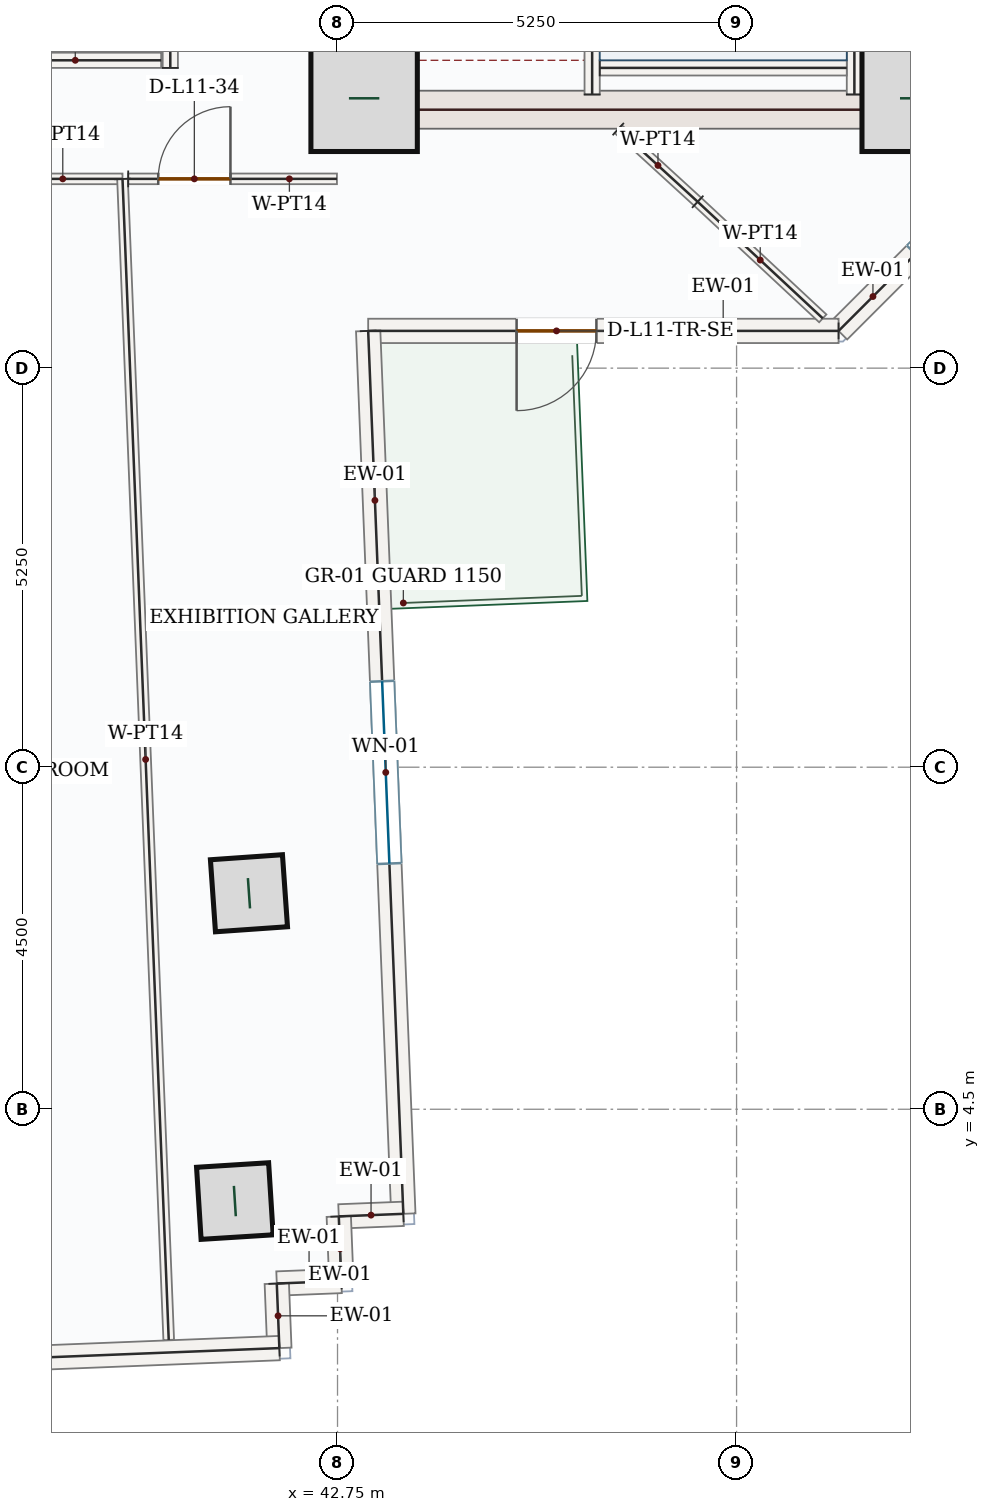
"""IFC4 building model, lengths in metres.
Left out: names, types, materials, properties, quantities, classifications, styles, units other than length and angle.
Written with IfcOpenShell. Run it as: python <this file> out.ifc"""

import sys

from ifc_helpers import new_model, si_unit, direction, frame, frame_2d, origin, origin_2d, place, context, subcontext, project, spatial, rectangle, hollow_rectangle, extrude, source, transform, mapped, element, fill, save


model = new_model("IFC4")
c1 = context("Model", 3, precision=1e-05, world=origin(), true_north=direction((0.0, 1.0)))
c2 = subcontext(c1, "Body", "Model", "MODEL_VIEW")
j1 = project(units=[si_unit("LENGTHUNIT", "METRE"), si_unit("PLANEANGLEUNIT", "RADIAN")], contexts=[c1])
p1 = place(None, origin())
s1 = spatial("IfcSite", under=j1, at=p1, CompositionType="ELEMENT")
p2 = place(p1, origin())
s2 = spatial("IfcBuilding", under=s1, at=p2, CompositionType="ELEMENT")
p3 = place(p2, frame((0.0, 0.0, 54.3)))
s3 = spatial("IfcBuildingStorey", under=s2, at=p3, CompositionType="ELEMENT", Elevation=54.3)
p4 = place(p3, frame((43.0, 17.4, 0.0), z_axis=(0.0, 0.0, 1.0), x_axis=(0.0, 1.0, 0.0)))
e1 = element("IfcWall", 1, at=p4, inside=s3, PredefinedType="SHEAR", context=c2, shape_type="SweptSolid", body=[
    extrude(rectangle(XDim=8.55, YDim=0.5, at=frame_2d((4.275, 0.0))), origin(), (0.0, 0.0, 1.0), 3.95),
])
p5 = place(p4, frame((6.65, 0.0, 0.0)))
e2 = element("IfcOpeningElement", 2, at=p5, cuts=e1, PredefinedType="OPENING", context=c2, shape_type="SweptSolid", body=[
    extrude(rectangle(XDim=1.1, YDim=2.2, at=frame_2d((0.55, 1.1))), frame((0.0, 0.26, 0.0), z_axis=(0.0, -1.0, 0.0), x_axis=(1.0, 0.0, 0.0)), (0.0, 0.0, 1.0), 0.52),
])
p6 = place(p4, frame((1.75, 0.0, 0.0)))
e3 = element("IfcOpeningElement", 3, at=p6, cuts=e1, PredefinedType="OPENING", context=c2, shape_type="SweptSolid", body=[
    extrude(rectangle(XDim=1.3, YDim=2.2, at=frame_2d((0.65, 1.1))), frame((0.0, 0.26, 0.0), z_axis=(0.0, -1.0, 0.0), x_axis=(1.0, 0.0, 0.0)), (0.0, 0.0, 1.0), 0.52),
])
p7 = place(p4, frame((4.3, 0.0, 0.0)))
e4 = element("IfcOpeningElement", 4, at=p7, cuts=e1, PredefinedType="OPENING", context=c2, shape_type="SweptSolid", body=[
    extrude(rectangle(XDim=0.88, YDim=2.1, at=frame_2d((0.44, 1.05))), frame((0.0, 0.26, 0.0), z_axis=(0.0, -1.0, 0.0), x_axis=(1.0, 0.0, 0.0)), (0.0, 0.0, 1.0), 0.52),
])
m1 = source(origin(), c2, "Body", "SweptSolid", [
    extrude(rectangle(XDim=8.55, YDim=0.5, at=frame_2d((4.275, 0.0))), origin(), (0.0, 0.0, 1.0), 3.95),
])
p8 = place(p3, frame((50.5, 17.4, 0.0), z_axis=(0.0, 0.0, 1.0), x_axis=(0.0, 1.0, 0.0)))
e5 = element("IfcWall", 5, at=p8, inside=s3, PredefinedType="SHEAR", context=c2, shape_type="MappedRepresentation", body=[
    mapped(m1, transform((0.0, 0.0, 0.0), x_axis=(1.0, 0.0, 0.0), y_axis=(0.0, 1.0, 0.0), z_axis=(0.0, 0.0, 1.0), scale=1.0)),
])
m2 = source(origin(), c2, "Body", "SweptSolid", [
    extrude(rectangle(XDim=7.0, YDim=0.5, at=frame_2d((3.5, 0.0))), origin(), (0.0, 0.0, 1.0), 3.95),
])
p9 = place(p3, frame((43.25, 17.65, 0.0), z_axis=(0.0, 0.0, 1.0), x_axis=(1.0, 0.0, 0.0)))
e6 = element("IfcWall", 6, at=p9, inside=s3, PredefinedType="SHEAR", context=c2, shape_type="MappedRepresentation", body=[
    mapped(m2, transform((0.0, 0.0, 0.0), x_axis=(1.0, 0.0, 0.0), y_axis=(0.0, 1.0, 0.0), z_axis=(0.0, 0.0, 1.0), scale=1.0)),
])
m3 = source(origin(), c2, "Body", "SweptSolid", [
    extrude(rectangle(XDim=1.4, YDim=1.4, at=origin_2d()), origin(), (0.0, 0.0, 1.0), 4.2),
])
for number, where, z_axis, x_axis in (
    (7, (43.1, 17.8, 0.0), (0.0, 0.0, 1.0), (1.0, 0.0, 0.0)),
    (8, (50.35, 17.8, 0.0), (0.0, 0.0, 1.0), (1.0, 0.0, 0.0)),
):
    element("IfcColumn", number, at=place(p3, frame(where, z_axis=z_axis, x_axis=x_axis)), inside=s3, PredefinedType="COLUMN", context=c2, shape_type="MappedRepresentation", body=[
        mapped(m3, transform((0.0, 0.0, 0.0), x_axis=(1.0, 0.0, 0.0), y_axis=(0.0, 1.0, 0.0), z_axis=(0.0, 0.0, 1.0), scale=1.0)),
    ])
m4 = source(origin(), c2, "Body", "SweptSolid", [
    extrude(hollow_rectangle(XDim=0.95, YDim=0.95, WallThickness=0.05, at=origin_2d()), origin(), (0.0, 0.0, 1.0), 4.2),
])
for number, where, z_axis, x_axis in (
    (9, (41.585, 7.342, 0.0), (0.0, 0.0, 1.0), (-0.07, 0.998, 0.0)),
    (10, (41.399, 3.292, 0.0), (0.0, 0.0, 1.0), (-0.063, 0.998, 0.0)),
):
    element("IfcColumn", number, at=place(p3, frame(where, z_axis=z_axis, x_axis=x_axis)), inside=s3, PredefinedType="COLUMN", context=c2, shape_type="MappedRepresentation", body=[
        mapped(m4, transform((0.0, 0.0, 0.0), x_axis=(1.0, 0.0, 0.0), y_axis=(0.0, 1.0, 0.0), z_axis=(0.0, 0.0, 1.0), scale=1.0)),
    ])
p10 = place(p3, frame((53.06, 18.458, 0.0), z_axis=(0.0, 0.0, 1.0), x_axis=(-0.707106781187, -0.707106781187, 0.0)))
e11 = element("IfcWall", 11, at=p10, inside=s3, PredefinedType="SOLIDWALL", context=c2, shape_type="SweptSolid", body=[
    extrude(rectangle(XDim=5.258, YDim=0.32, at=frame_2d((2.629, 0.0))), origin(), (0.0, 0.0, 1.0), 3.95),
])
p11 = place(p10, frame((1.429, 0.0, 0.85)))
e12 = element("IfcOpeningElement", 12, at=p11, cuts=e11, PredefinedType="OPENING", context=c2, shape_type="SweptSolid", body=[
    extrude(rectangle(XDim=2.4, YDim=1.8, at=frame_2d((1.2, 0.9))), frame((0.0, 0.17, 0.0), z_axis=(0.0, -1.0, 0.0), x_axis=(1.0, 0.0, 0.0)), (0.0, 0.0, 1.0), 0.34),
])
p12 = place(p3, frame((49.342, 14.74, 0.0), z_axis=(0.0, 0.0, 1.0), x_axis=(-1.0, 0.0, 0.0)))
e13 = element("IfcWall", 13, at=p12, inside=s3, PredefinedType="SOLIDWALL", context=c2, shape_type="SweptSolid", body=[
    extrude(rectangle(XDim=6.189, YDim=0.32, at=frame_2d((3.094, 0.0))), origin(), (0.0, 0.0, 1.0), 3.95),
])
p13 = place(p12, frame((3.186, 0.0, 0.0)))
e14 = element("IfcOpeningElement", 14, at=p13, cuts=e13, PredefinedType="OPENING", context=c2, shape_type="SweptSolid", body=[
    extrude(rectangle(XDim=1.05, YDim=2.15, at=frame_2d((0.525, 1.075))), frame((0.0, 0.17, 0.0), z_axis=(0.0, -1.0, 0.0), x_axis=(1.0, 0.0, 0.0)), (0.0, 0.0, 1.0), 0.34),
])
p14 = place(p3, frame((43.153, 14.74, 0.0), z_axis=(0.0, 0.0, 1.0), x_axis=(0.039775975357, -0.999208622753, 0.0)))
e15 = element("IfcWall", 15, at=p14, inside=s3, PredefinedType="SOLIDWALL", context=c2, shape_type="SweptSolid", body=[
    extrude(rectangle(XDim=11.625, YDim=0.32, at=frame_2d((5.812, 0.0))), origin(), (0.0, 0.0, 1.0), 3.95),
])
p15 = place(p14, frame((4.613, 0.0, 0.85)))
e16 = element("IfcOpeningElement", 16, at=p15, cuts=e15, PredefinedType="OPENING", context=c2, shape_type="SweptSolid", body=[
    extrude(rectangle(XDim=2.4, YDim=1.8, at=frame_2d((1.2, 0.9))), frame((0.0, 0.17, 0.0), z_axis=(0.0, -1.0, 0.0), x_axis=(1.0, 0.0, 0.0)), (0.0, 0.0, 1.0), 0.34),
])
m5 = source(origin(), c2, "Body", "SweptSolid", [
    extrude(rectangle(XDim=0.85, YDim=0.32, at=frame_2d((0.425, 0.0))), origin(), (0.0, 0.0, 1.0), 3.95),
])
for number, where, z_axis, x_axis in (
    (17, (43.616, 3.124, 0.0), (0.0, 0.0, 1.0), (-0.999, -0.04, 0.0)),
    (18, (42.767, 3.09, 0.0), (0.0, 0.0, 1.0), (0.04, -0.999, 0.0)),
):
    element("IfcWall", number, at=place(p3, frame(where, z_axis=z_axis, x_axis=x_axis)), inside=s3, PredefinedType="SOLIDWALL", context=c2, shape_type="MappedRepresentation", body=[
        mapped(m5, transform((0.0, 0.0, 0.0), x_axis=(1.0, 0.0, 0.0), y_axis=(0.0, 1.0, 0.0), z_axis=(0.0, 0.0, 1.0), scale=1.0)),
    ])
m6 = source(origin(), c2, "Body", "SweptSolid", [
    extrude(rectangle(XDim=0.85, YDim=0.32, at=frame_2d((0.425, 0.0))), origin(), (0.0, 0.0, 1.0), 3.95),
])
p16 = place(p3, frame((42.8, 2.241, 0.0), z_axis=(0.0, 0.0, 1.0), x_axis=(-0.999202792875, -0.039922158152, 0.0)))
e19 = element("IfcWall", 19, at=p16, inside=s3, PredefinedType="SOLIDWALL", context=c2, shape_type="MappedRepresentation", body=[
    mapped(m6, transform((0.0, 0.0, 0.0), x_axis=(1.0, 0.0, 0.0), y_axis=(0.0, 1.0, 0.0), z_axis=(0.0, 0.0, 1.0), scale=1.0)),
])
p17 = place(p3, frame((41.951, 2.207, 0.0), z_axis=(0.0, 0.0, 1.0), x_axis=(0.039933618331, -0.999202334929, 0.0)))
e20 = element("IfcWall", 20, at=p17, inside=s3, PredefinedType="SOLIDWALL", context=c2, shape_type="MappedRepresentation", body=[
    mapped(m5, transform((0.0, 0.0, 0.0), x_axis=(1.0, 0.0, 0.0), y_axis=(0.0, 1.0, 0.0), z_axis=(0.0, 0.0, 1.0), scale=1.0)),
])
m7 = source(origin(), c2, "Body", "SweptSolid", [
    extrude(rectangle(XDim=9.92, YDim=0.32, at=frame_2d((4.96, 0.0))), origin(), (0.0, 0.0, 1.0), 3.95),
])
p18 = place(p3, frame((41.985, 1.358, 0.0), z_axis=(0.0, 0.0, 1.0), x_axis=(-0.999207823998, -0.039796035749, 0.0)))
e21 = element("IfcWall", 21, at=p18, inside=s3, PredefinedType="SOLIDWALL", context=c2, shape_type="MappedRepresentation", body=[
    mapped(m7, transform((0.0, 0.0, 0.0), x_axis=(1.0, 0.0, 0.0), y_axis=(0.0, 1.0, 0.0), z_axis=(0.0, 0.0, 1.0), scale=1.0)),
])
m8 = source(origin(), c2, "Body", "SweptSolid", [
    extrude(rectangle(XDim=7.87, YDim=0.2, at=frame_2d((3.935, 0.0))), origin(), (0.0, 0.0, 1.0), 3.95),
])
p19 = place(p3, frame((49.55, 17.85, 0.0), z_axis=(0.0, 0.0, 1.0), x_axis=(0.0, 1.0, 0.0)))
e22 = element("IfcWall", 22, at=p19, inside=s3, PredefinedType="SOLIDWALL", context=c2, shape_type="MappedRepresentation", body=[
    mapped(m8, transform((0.0, 0.0, 0.0), x_axis=(1.0, 0.0, 0.0), y_axis=(0.0, 1.0, 0.0), z_axis=(0.0, 0.0, 1.0), scale=1.0)),
])
p20 = place(p3, frame((46.1, 17.85, 0.0), z_axis=(0.0, 0.0, 1.0), x_axis=(0.0, 1.0, 0.0)))
e23 = element("IfcWall", 23, at=p20, inside=s3, PredefinedType="SOLIDWALL", context=c2, shape_type="SweptSolid", body=[
    extrude(rectangle(XDim=8.0, YDim=0.2, at=frame_2d((4.0, 0.0))), origin(), (0.0, 0.0, 1.0), 3.95),
])
p21 = place(p20, frame((6.3, 0.0, 0.0)))
e24 = element("IfcOpeningElement", 24, at=p21, cuts=e23, PredefinedType="OPENING", context=c2, shape_type="SweptSolid", body=[
    extrude(rectangle(XDim=1.05, YDim=2.15, at=frame_2d((0.525, 1.075))), frame((0.0, 0.11, 0.0), z_axis=(0.0, -1.0, 0.0), x_axis=(1.0, 0.0, 0.0)), (0.0, 0.0, 1.0), 0.22),
])
m9 = source(origin(), c2, "Body", "SweptSolid", [
    extrude(rectangle(XDim=3.25, YDim=0.2, at=frame_2d((1.625, 0.0))), origin(), (0.0, 0.0, 1.0), 3.95),
])
p22 = place(p3, frame((46.2, 18.2, 0.0), z_axis=(0.0, 0.0, 1.0), x_axis=(1.0, 0.0, 0.0)))
e25 = element("IfcWall", 25, at=p22, inside=s3, PredefinedType="SOLIDWALL", context=c2, shape_type="MappedRepresentation", body=[
    mapped(m9, transform((0.0, 0.0, 0.0), x_axis=(1.0, 0.0, 0.0), y_axis=(0.0, 1.0, 0.0), z_axis=(0.0, 0.0, 1.0), scale=1.0)),
])
m10 = source(origin(), c2, "Body", "SweptSolid", [
    extrude(rectangle(XDim=2.35, YDim=0.2, at=frame_2d((1.175, 0.0))), origin(), (0.0, 0.0, 1.0), 3.95),
])
p23 = place(p3, frame((40.55, 18.2, 0.0), z_axis=(0.0, 0.0, 1.0), x_axis=(0.0, 1.0, 0.0)))
e26 = element("IfcWall", 26, at=p23, inside=s3, PredefinedType="SOLIDWALL", context=c2, shape_type="MappedRepresentation", body=[
    mapped(m10, transform((0.0, 0.0, 0.0), x_axis=(1.0, 0.0, 0.0), y_axis=(0.0, 1.0, 0.0), z_axis=(0.0, 0.0, 1.0), scale=1.0)),
])
m11 = source(origin(), c2, "Body", "SweptSolid", [
    extrude(rectangle(XDim=2.26, YDim=0.2, at=frame_2d((1.13, 0.0))), origin(), (0.0, 0.0, 1.0), 3.95),
])
p24 = place(p3, frame((38.17, 18.3, 0.0), z_axis=(0.0, 0.0, 1.0), x_axis=(1.0, 0.0, 0.0)))
e27 = element("IfcWall", 27, at=p24, inside=s3, PredefinedType="SOLIDWALL", context=c2, shape_type="MappedRepresentation", body=[
    mapped(m11, transform((0.0, 0.0, 0.0), x_axis=(1.0, 0.0, 0.0), y_axis=(0.0, 1.0, 0.0), z_axis=(0.0, 0.0, 1.0), scale=1.0)),
])
p25 = place(p3, frame((36.764, 16.74, 0.0), z_axis=(0.0, 0.0, 1.0), x_axis=(1.0, 0.0, 0.0)))
e28 = element("IfcWall", 28, at=p25, inside=s3, PredefinedType="PARTITIONING", context=c2, shape_type="SweptSolid", body=[
    extrude(rectangle(XDim=3.157, YDim=0.14, at=frame_2d((1.579, 0.0))), origin(), (0.0, 0.0, 1.0), 3.95),
])
p26 = place(p25, frame((0.486, 0.0, 0.0)))
e29 = element("IfcOpeningElement", 29, at=p26, cuts=e28, PredefinedType="OPENING", context=c2, shape_type="SweptSolid", body=[
    extrude(rectangle(XDim=0.95, YDim=2.15, at=frame_2d((0.475, 1.075))), frame((0.0, 0.08, 0.0), z_axis=(0.0, -1.0, 0.0), x_axis=(1.0, 0.0, 0.0)), (0.0, 0.0, 1.0), 0.16),
])
m12 = source(origin(), c2, "Body", "SweptSolid", [
    extrude(rectangle(XDim=15.286, YDim=0.14, at=frame_2d((7.643, 0.0))), origin(), (0.0, 0.0, 1.0), 3.95),
])
p27 = place(p3, frame((39.921, 16.739, 0.0), z_axis=(0.0, 0.0, 1.0), x_axis=(0.039769031662, -0.99920889914, 0.0)))
e30 = element("IfcWall", 30, at=p27, inside=s3, PredefinedType="PARTITIONING", context=c2, shape_type="MappedRepresentation", body=[
    mapped(m12, transform((0.0, 0.0, 0.0), x_axis=(1.0, 0.0, 0.0), y_axis=(0.0, 1.0, 0.0), z_axis=(0.0, 0.0, 1.0), scale=1.0)),
])
p28 = place(p3, frame((39.996, 16.74, 0.0), z_axis=(0.0, 0.0, 1.0), x_axis=(0.999999996048, 8.8904694e-05, 0.0)))
e31 = element("IfcWall", 31, at=p28, inside=s3, PredefinedType="PARTITIONING", context=c2, shape_type="SweptSolid", body=[
    extrude(rectangle(XDim=2.746, YDim=0.14, at=frame_2d((1.373, 0.0))), origin(), (0.0, 0.0, 1.0), 3.95),
])
p29 = place(p28, frame((0.395, 0.0, 0.0)))
e32 = element("IfcOpeningElement", 32, at=p29, cuts=e31, PredefinedType="OPENING", context=c2, shape_type="SweptSolid", body=[
    extrude(rectangle(XDim=0.95, YDim=2.15, at=frame_2d((0.475, 1.075))), frame((0.0, 0.08, 0.0), z_axis=(0.0, -1.0, 0.0), x_axis=(1.0, 0.0, 0.0)), (0.0, 0.0, 1.0), 0.16),
])
m13 = source(origin(), c2, "Body", "SweptSolid", [
    extrude(rectangle(XDim=1.417, YDim=0.14, at=frame_2d((0.708, 0.0))), origin(), (0.0, 0.0, 1.0), 3.95),
])
p30 = place(p3, frame((46.443, 17.395, 0.0), z_axis=(0.0, 0.0, 1.0), x_axis=(0.737776192982, -0.675045397784, 0.0)))
e33 = element("IfcWall", 33, at=p30, inside=s3, PredefinedType="PARTITIONING", context=c2, shape_type="MappedRepresentation", body=[
    mapped(m13, transform((0.0, 0.0, 0.0), x_axis=(1.0, 0.0, 0.0), y_axis=(0.0, 1.0, 0.0), z_axis=(0.0, 0.0, 1.0), scale=1.0)),
])
m14 = source(origin(), c2, "Body", "SweptSolid", [
    extrude(rectangle(XDim=2.25, YDim=0.14, at=frame_2d((1.125, 0.0))), origin(), (0.0, 0.0, 1.0), 3.95),
])
p31 = place(p3, frame((47.489, 16.439, 0.0), z_axis=(0.0, 0.0, 1.0), x_axis=(0.731524295554, -0.68181537458, 0.0)))
e34 = element("IfcWall", 34, at=p31, inside=s3, PredefinedType="PARTITIONING", context=c2, shape_type="MappedRepresentation", body=[
    mapped(m14, transform((0.0, 0.0, 0.0), x_axis=(1.0, 0.0, 0.0), y_axis=(0.0, 1.0, 0.0), z_axis=(0.0, 0.0, 1.0), scale=1.0)),
])
m15 = source(origin(), c2, "Body", "SweptSolid", [
    extrude(rectangle(XDim=1.05, YDim=2.15, at=frame_2d((0.525, 1.075))), frame((0.0, 0.025, 0.0), z_axis=(0.0, -1.0, 0.0), x_axis=(1.0, 0.0, 0.0)), (0.0, 0.0, 1.0), 0.05),
])
p32 = place(p13, origin())
e35 = element("IfcDoor", 35, at=p32, inside=s3, OperationType="SINGLE_SWING_RIGHT", PredefinedType="DOOR", context=c2, shape_type="MappedRepresentation", body=[
    mapped(m15, transform((0.0, 0.0, 0.0), x_axis=(1.0, 0.0, 0.0), y_axis=(0.0, 1.0, 0.0), z_axis=(0.0, 0.0, 1.0), scale=1.0)),
])
fill(e14, e35)
m16 = source(origin(), c2, "Body", "SweptSolid", [
    extrude(rectangle(XDim=2.4, YDim=1.8, at=frame_2d((1.2, 0.9))), frame((0.0, 0.03, 0.0), z_axis=(0.0, -1.0, 0.0), x_axis=(1.0, 0.0, 0.0)), (0.0, 0.0, 1.0), 0.06),
])
p33 = place(p15, origin())
e36 = element("IfcWindow", 36, at=p33, inside=s3, PartitioningType="DOUBLE_PANEL_VERTICAL", PredefinedType="WINDOW", context=c2, shape_type="MappedRepresentation", body=[
    mapped(m16, transform((0.0, 0.0, 0.0), x_axis=(1.0, 0.0, 0.0), y_axis=(0.0, 1.0, 0.0), z_axis=(0.0, 0.0, 1.0), scale=1.0)),
])
fill(e16, e36)
m17 = source(origin(), c2, "Body", "SweptSolid", [
    extrude(rectangle(XDim=0.95, YDim=2.15, at=frame_2d((0.475, 1.075))), frame((0.0, 0.025, 0.0), z_axis=(0.0, -1.0, 0.0), x_axis=(1.0, 0.0, 0.0)), (0.0, 0.0, 1.0), 0.05),
])
p34 = place(p29, origin())
e37 = element("IfcDoor", 37, at=p34, inside=s3, OperationType="SINGLE_SWING_RIGHT", PredefinedType="DOOR", context=c2, shape_type="MappedRepresentation", body=[
    mapped(m17, transform((0.0, 0.0, 0.0), x_axis=(1.0, 0.0, 0.0), y_axis=(0.0, 1.0, 0.0), z_axis=(0.0, 0.0, 1.0), scale=1.0)),
])
fill(e32, e37)
save(model, sys.argv[1])
